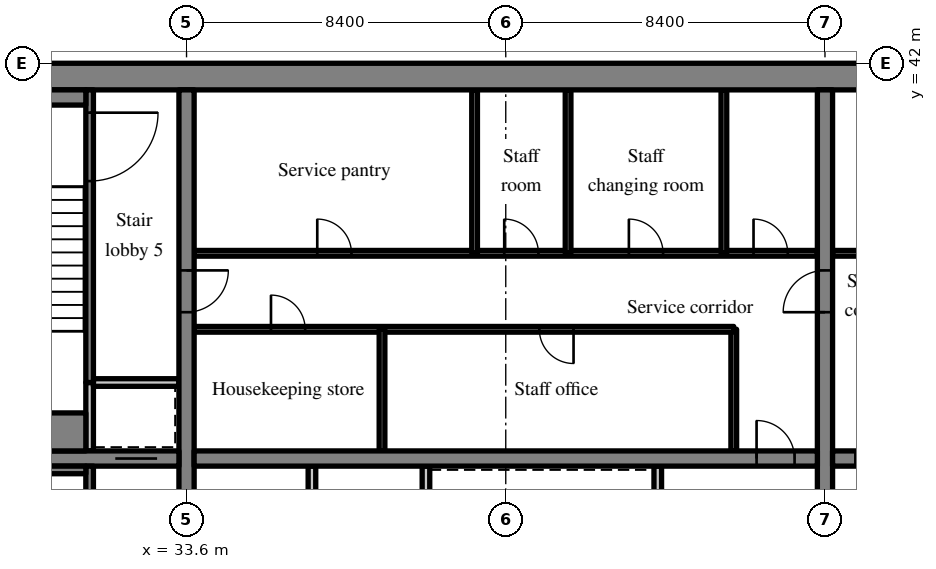
"""IFC4 building model, lengths in metres.
Left out: names, types, materials, properties, quantities, classifications, styles, units other than length and angle.
Written with IfcOpenShell. Run it as: python <this file> out.ifc"""

import sys

from ifc_helpers import new_model, si_unit, direction, frame, frame_2d, origin, place, context, subcontext, project, spatial, rectangle, extrude, source, transform, mapped, element, fill, save


model = new_model("IFC4")
c1 = context("Model", 3, precision=1e-05, world=origin(), true_north=direction((0.0, 1.0)))
c2 = subcontext(c1, "Body", "Model", "MODEL_VIEW")
j1 = project(units=[si_unit("LENGTHUNIT", "METRE"), si_unit("PLANEANGLEUNIT", "RADIAN")], contexts=[c1])
p1 = place(None, origin())
s1 = spatial("IfcSite", under=j1, at=p1, CompositionType="ELEMENT")
p2 = place(p1, origin())
s2 = spatial("IfcBuilding", under=s1, at=p2, CompositionType="ELEMENT")
p3 = place(p2, frame((0.0, 0.0, 166.8)))
s3 = spatial("IfcBuildingStorey", under=s2, at=p3, CompositionType="ELEMENT", Elevation=166.8)
m1 = source(origin(), c2, "Body", "SweptSolid", [
    extrude(rectangle(XDim=50.4, YDim=0.7, at=frame_2d((25.2, 0.0))), origin(), (0.0, 0.0, 1.0), 3.52),
])
p4 = place(p3, frame((25.2, 41.65, 0.0), z_axis=(0.0, 0.0, 1.0), x_axis=(1.0, 0.0, 0.0)))
e1 = element("IfcWall", 1, at=p4, inside=s3, PredefinedType="SHEAR", context=c2, shape_type="MappedRepresentation", body=[
    mapped(m1, transform((0.0, 0.0, 0.0), scale=1.0)),
])
m2 = source(origin(), c2, "Body", "SweptSolid", [
    extrude(rectangle(XDim=18.6, YDim=0.4, at=frame_2d((9.3, 0.0))), origin(), (0.0, 0.0, 1.0), 3.52),
])
p5 = place(p3, frame((33.6, 22.7, 0.0), z_axis=(0.0, 0.0, 1.0), x_axis=(0.0, 1.0, 0.0)))
e2 = element("IfcWall", 2, at=p5, inside=s3, PredefinedType="SHEAR", context=c2, shape_type="MappedRepresentation", body=[
    mapped(m2, transform((0.0, 0.0, 0.0), scale=1.0)),
])
m3 = source(origin(), c2, "Body", "SweptSolid", [
    extrude(rectangle(XDim=1.1, YDim=2.1, at=frame_2d((0.55, 1.05))), frame((0.0, 0.21, 0.0), z_axis=(0.0, -1.0, 0.0), x_axis=(1.0, 0.0, 0.0)), (0.0, 0.0, 1.0), 0.42),
])
p6 = place(p5, frame((12.75, 0.0, 0.0)))
e3 = element("IfcOpeningElement", 3, at=p6, cuts=e2, PredefinedType="OPENING", context=c2, shape_type="MappedRepresentation", body=[
    mapped(m3, transform((0.0, 0.0, 0.0), scale=1.0)),
])
p7 = place(p3, frame((50.4, 22.7, 0.0), z_axis=(0.0, 0.0, 1.0), x_axis=(0.0, 1.0, 0.0)))
e4 = element("IfcWall", 4, at=p7, inside=s3, PredefinedType="SHEAR", context=c2, shape_type="MappedRepresentation", body=[
    mapped(m2, transform((0.0, 0.0, 0.0), scale=1.0)),
])
p8 = place(p7, frame((12.75, 0.0, 0.0)))
e5 = element("IfcOpeningElement", 5, at=p8, cuts=e4, PredefinedType="OPENING", context=c2, shape_type="MappedRepresentation", body=[
    mapped(m3, transform((0.0, 0.0, 0.0), scale=1.0)),
])
m4 = source(origin(), c2, "Body", "SweptSolid", [
    extrude(rectangle(XDim=7.5, YDim=0.4, at=frame_2d((3.75, 0.0))), origin(), (0.0, 0.0, 1.0), 3.52),
])
p9 = place(p3, frame((25.9, 31.6, 0.0), z_axis=(0.0, 0.0, 1.0), x_axis=(1.0, 0.0, 0.0)))
e6 = element("IfcWall", 6, at=p9, inside=s3, PredefinedType="SHEAR", context=c2, shape_type="MappedRepresentation", body=[
    mapped(m4, transform((0.0, 0.0, 0.0), scale=1.0)),
])
p10 = place(p9, frame((5.825, 0.0, 0.0)))
e7 = element("IfcOpeningElement", 7, at=p10, cuts=e6, PredefinedType="OPENING", context=c2, shape_type="MappedRepresentation", body=[
    mapped(m3, transform((0.0, 0.0, 0.0), scale=1.0)),
])
m5 = source(origin(), c2, "Body", "SweptSolid", [
    extrude(rectangle(XDim=16.4, YDim=0.4, at=frame_2d((8.2, 0.0))), origin(), (0.0, 0.0, 1.0), 3.52),
])
p11 = place(p3, frame((33.8, 31.6, 0.0), z_axis=(0.0, 0.0, 1.0), x_axis=(1.0, 0.0, 0.0)))
e8 = element("IfcWall", 8, at=p11, inside=s3, PredefinedType="SHEAR", context=c2, shape_type="MappedRepresentation", body=[
    mapped(m5, transform((0.0, 0.0, 0.0), scale=1.0)),
])
m6 = source(origin(), c2, "Body", "SweptSolid", [
    extrude(rectangle(XDim=1.0, YDim=2.1, at=frame_2d((0.5, 1.05))), frame((0.0, 0.21, 0.0), z_axis=(0.0, -1.0, 0.0), x_axis=(1.0, 0.0, 0.0)), (0.0, 0.0, 1.0), 0.42),
])
p12 = place(p11, frame((14.8, 0.0, 0.0)))
e9 = element("IfcOpeningElement", 9, at=p12, cuts=e8, PredefinedType="OPENING", context=c2, shape_type="MappedRepresentation", body=[
    mapped(m6, transform((0.0, 0.0, 0.0), scale=1.0)),
])
p13 = place(p3, frame((50.6, 31.6, 0.0), z_axis=(0.0, 0.0, 1.0), x_axis=(1.0, 0.0, 0.0)))
e10 = element("IfcWall", 10, at=p13, inside=s3, PredefinedType="SHEAR", context=c2, shape_type="MappedRepresentation", body=[
    mapped(m5, transform((0.0, 0.0, 0.0), scale=1.0)),
])
p14 = place(p13, frame((0.6, 0.0, 0.0)))
e11 = element("IfcOpeningElement", 11, at=p14, cuts=e10, PredefinedType="OPENING", context=c2, shape_type="MappedRepresentation", body=[
    mapped(m6, transform((0.0, 0.0, 0.0), scale=1.0)),
])
m7 = source(origin(), c2, "Body", "SweptSolid", [
    extrude(rectangle(XDim=8.7, YDim=0.2, at=frame_2d((4.35, 0.0))), origin(), (0.0, 0.0, 1.0), 3.52),
])
p15 = place(p3, frame((39.9, 22.7, 0.0), z_axis=(0.0, 0.0, 1.0), x_axis=(0.0, 1.0, 0.0)))
e12 = element("IfcWall", 12, at=p15, inside=s3, PredefinedType="PARTITIONING", context=c2, shape_type="MappedRepresentation", body=[
    mapped(m7, transform((0.0, 0.0, 0.0), scale=1.0)),
])
m8 = source(origin(), c2, "Body", "SweptSolid", [
    extrude(rectangle(XDim=0.9, YDim=2.1, at=frame_2d((0.45, 1.05))), frame((0.0, 0.11, 0.0), z_axis=(0.0, -1.0, 0.0), x_axis=(1.0, 0.0, 0.0)), (0.0, 0.0, 1.0), 0.22),
])
p16 = place(p15, frame((3.85, 0.0, 0.0)))
e13 = element("IfcOpeningElement", 13, at=p16, cuts=e12, PredefinedType="OPENING", context=c2, shape_type="MappedRepresentation", body=[
    mapped(m8, transform((0.0, 0.0, 0.0), scale=1.0)),
])
m9 = source(origin(), c2, "Body", "SweptSolid", [
    extrude(rectangle(XDim=2.6, YDim=0.2, at=frame_2d((1.3, 0.0))), origin(), (0.0, 0.0, 1.0), 3.52),
])
p17 = place(p3, frame((46.0, 28.8, 0.0), z_axis=(0.0, 0.0, 1.0), x_axis=(0.0, 1.0, 0.0)))
e14 = element("IfcWall", 14, at=p17, inside=s3, PredefinedType="SOLIDWALL", context=c2, shape_type="MappedRepresentation", body=[
    mapped(m9, transform((0.0, 0.0, 0.0), scale=1.0)),
])
p18 = place(p3, frame((36.9, 22.7, 0.0), z_axis=(0.0, 0.0, 1.0), x_axis=(0.0, 1.0, 0.0)))
e15 = element("IfcWall", 15, at=p18, inside=s3, PredefinedType="PARTITIONING", context=c2, shape_type="MappedRepresentation", body=[
    mapped(m7, transform((0.0, 0.0, 0.0), scale=1.0)),
])
m10 = source(origin(), c2, "Body", "SweptSolid", [
    extrude(rectangle(XDim=3.2, YDim=0.15, at=frame_2d((1.6, 0.0))), origin(), (0.0, 0.0, 1.0), 3.52),
])
p19 = place(p3, frame((48.0, 31.8, 0.0), z_axis=(0.0, 0.0, 1.0), x_axis=(0.0, 1.0, 0.0)))
e16 = element("IfcWall", 16, at=p19, inside=s3, PredefinedType="PARTITIONING", context=c2, shape_type="MappedRepresentation", body=[
    mapped(m10, transform((0.0, 0.0, 0.0), scale=1.0)),
])
m11 = source(origin(), c2, "Body", "SweptSolid", [
    extrude(rectangle(XDim=14.2, YDim=0.15, at=frame_2d((7.1, 0.0))), origin(), (0.0, 0.0, 1.0), 3.52),
])
p20 = place(p3, frame((33.8, 35.0, 0.0), z_axis=(0.0, 0.0, 1.0), x_axis=(1.0, 0.0, 0.0)))
e17 = element("IfcWall", 17, at=p20, inside=s3, PredefinedType="PARTITIONING", context=c2, shape_type="MappedRepresentation", body=[
    mapped(m11, transform((0.0, 0.0, 0.0), scale=1.0)),
])
m12 = source(origin(), c2, "Body", "SweptSolid", [
    extrude(rectangle(XDim=0.9, YDim=2.1, at=frame_2d((0.45, 1.05))), frame((0.0, 0.085, 0.0), z_axis=(0.0, -1.0, 0.0), x_axis=(1.0, 0.0, 0.0)), (0.0, 0.0, 1.0), 0.17),
])
p21 = place(p20, frame((2.022, 0.0, 0.0)))
e18 = element("IfcOpeningElement", 18, at=p21, cuts=e17, PredefinedType="OPENING", context=c2, shape_type="MappedRepresentation", body=[
    mapped(m12, transform((0.0, 0.0, 0.0), scale=1.0)),
])
p22 = place(p20, frame((9.084, 0.0, 0.0)))
e19 = element("IfcOpeningElement", 19, at=p22, cuts=e17, PredefinedType="OPENING", context=c2, shape_type="MappedRepresentation", body=[
    mapped(m12, transform((0.0, 0.0, 0.0), scale=1.0)),
])
m13 = source(origin(), c2, "Body", "SweptSolid", [
    extrude(rectangle(XDim=16.4, YDim=0.15, at=frame_2d((8.2, 0.0))), origin(), (0.0, 0.0, 1.0), 3.52),
])
p23 = place(p3, frame((33.8, 37.0, 0.0), z_axis=(0.0, 0.0, 1.0), x_axis=(1.0, 0.0, 0.0)))
e20 = element("IfcWall", 20, at=p23, inside=s3, PredefinedType="PARTITIONING", context=c2, shape_type="MappedRepresentation", body=[
    mapped(m13, transform((0.0, 0.0, 0.0), scale=1.0)),
])
p24 = place(p23, frame((3.24, 0.0, 0.0)))
e21 = element("IfcOpeningElement", 21, at=p24, cuts=e20, PredefinedType="OPENING", context=c2, shape_type="MappedRepresentation", body=[
    mapped(m12, transform((0.0, 0.0, 0.0), scale=1.0)),
])
p25 = place(p23, frame((8.16, 0.0, 0.0)))
e22 = element("IfcOpeningElement", 22, at=p25, cuts=e20, PredefinedType="OPENING", context=c2, shape_type="MappedRepresentation", body=[
    mapped(m12, transform((0.0, 0.0, 0.0), scale=1.0)),
])
p26 = place(p23, frame((11.44, 0.0, 0.0)))
e23 = element("IfcOpeningElement", 23, at=p26, cuts=e20, PredefinedType="OPENING", context=c2, shape_type="MappedRepresentation", body=[
    mapped(m12, transform((0.0, 0.0, 0.0), scale=1.0)),
])
p27 = place(p23, frame((14.72, 0.0, 0.0)))
e24 = element("IfcOpeningElement", 24, at=p27, cuts=e20, PredefinedType="OPENING", context=c2, shape_type="MappedRepresentation", body=[
    mapped(m12, transform((0.0, 0.0, 0.0), scale=1.0)),
])
p28 = place(p3, frame((38.744, 31.8, 0.0), z_axis=(0.0, 0.0, 1.0), x_axis=(0.0, 1.0, 0.0)))
e25 = element("IfcWall", 25, at=p28, inside=s3, PredefinedType="PARTITIONING", context=c2, shape_type="MappedRepresentation", body=[
    mapped(m10, transform((0.0, 0.0, 0.0), scale=1.0)),
])
m14 = source(origin(), c2, "Body", "SweptSolid", [
    extrude(rectangle(XDim=4.3, YDim=0.15, at=frame_2d((2.15, 0.0))), origin(), (0.0, 0.0, 1.0), 3.52),
])
for number, where, z_axis, x_axis in (
    (26, (41.18, 37.0, 0.0), (0.0, 0.0, 1.0), (0.0, 1.0, 0.0)),
    (27, (43.64, 37.0, 0.0), (0.0, 0.0, 1.0), (0.0, 1.0, 0.0)),
    (28, (47.74, 37.0, 0.0), (0.0, 0.0, 1.0), (0.0, 1.0, 0.0)),
):
    element("IfcWall", number, at=place(p3, frame(where, z_axis=z_axis, x_axis=x_axis)), inside=s3, PredefinedType="PARTITIONING", context=c2, shape_type="MappedRepresentation", body=[
        mapped(m14, transform((0.0, 0.0, 0.0), scale=1.0)),
    ])
p29 = place(p3, frame((67.0, 37.0, 0.0), z_axis=(0.0, 0.0, 1.0), x_axis=(-1.0, 0.0, 0.0)))
e29 = element("IfcWall", 29, at=p29, inside=s3, PredefinedType="PARTITIONING", context=c2, shape_type="MappedRepresentation", body=[
    mapped(m13, transform((0.0, 0.0, 0.0), scale=1.0)),
])
p30 = place(p29, frame((0.78, 0.0, 0.0)))
e30 = element("IfcOpeningElement", 30, at=p30, cuts=e29, PredefinedType="OPENING", context=c2, shape_type="MappedRepresentation", body=[
    mapped(m12, transform((0.0, 0.0, 0.0), scale=1.0)),
])
p31 = place(p29, frame((3.65, 0.0, 0.0)))
e31 = element("IfcOpeningElement", 31, at=p31, cuts=e29, PredefinedType="OPENING", context=c2, shape_type="MappedRepresentation", body=[
    mapped(m12, transform((0.0, 0.0, 0.0), scale=1.0)),
])
p32 = place(p29, frame((9.39, 0.0, 0.0)))
e32 = element("IfcOpeningElement", 32, at=p32, cuts=e29, PredefinedType="OPENING", context=c2, shape_type="MappedRepresentation", body=[
    mapped(m12, transform((0.0, 0.0, 0.0), scale=1.0)),
])
p33 = place(p29, frame((14.72, 0.0, 0.0)))
e33 = element("IfcOpeningElement", 33, at=p33, cuts=e29, PredefinedType="OPENING", context=c2, shape_type="MappedRepresentation", body=[
    mapped(m12, transform((0.0, 0.0, 0.0), scale=1.0)),
])
m15 = source(origin(), c2, "Body", "SweptSolid", [
    extrude(rectangle(XDim=8.7, YDim=0.2, at=frame_2d((4.35, 0.0))), origin(), (0.0, 0.0, 1.0), 3.52),
])
p34 = place(p3, frame((31.05, 22.7, 0.0), z_axis=(0.0, 0.0, 1.0), x_axis=(0.0, 1.0, 0.0)))
e34 = element("IfcWall", 34, at=p34, inside=s3, PredefinedType="SOLIDWALL", context=c2, shape_type="MappedRepresentation", body=[
    mapped(m15, transform((0.0, 0.0, 0.0), scale=1.0)),
])
m16 = source(origin(), c2, "Body", "SweptSolid", [
    extrude(rectangle(XDim=1.2, YDim=2.1, at=frame_2d((0.6, 1.05))), frame((0.0, 0.11, 0.0), z_axis=(0.0, -1.0, 0.0), x_axis=(1.0, 0.0, 0.0)), (0.0, 0.0, 1.0), 0.22),
])
p35 = place(p34, frame((6.8, 0.0, 0.0)))
e35 = element("IfcOpeningElement", 35, at=p35, cuts=e34, PredefinedType="OPENING", context=c2, shape_type="MappedRepresentation", body=[
    mapped(m16, transform((0.0, 0.0, 0.0), scale=1.0)),
])
m17 = source(origin(), c2, "Body", "SweptSolid", [
    extrude(rectangle(XDim=1.8, YDim=0.2, at=frame_2d((0.9, 0.0))), origin(), (0.0, 0.0, 1.0), 3.52),
])
p36 = place(p3, frame((31.05, 31.8, 0.0), z_axis=(0.0, 0.0, 1.0), x_axis=(0.0, 1.0, 0.0)))
e36 = element("IfcWall", 36, at=p36, inside=s3, PredefinedType="SOLIDWALL", context=c2, shape_type="MappedRepresentation", body=[
    mapped(m17, transform((0.0, 0.0, 0.0), scale=1.0)),
])
m18 = source(origin(), c2, "Body", "SweptSolid", [
    extrude(rectangle(XDim=2.25, YDim=0.2, at=frame_2d((1.125, 0.0))), origin(), (0.0, 0.0, 1.0), 3.52),
])
p37 = place(p3, frame((31.15, 33.6, 0.0), z_axis=(0.0, 0.0, 1.0), x_axis=(1.0, 0.0, 0.0)))
e37 = element("IfcWall", 37, at=p37, inside=s3, PredefinedType="SOLIDWALL", context=c2, shape_type="MappedRepresentation", body=[
    mapped(m18, transform((0.0, 0.0, 0.0), scale=1.0)),
])
m19 = source(origin(), c2, "Body", "SweptSolid", [
    extrude(rectangle(XDim=7.7, YDim=0.2, at=frame_2d((3.85, 0.0))), origin(), (0.0, 0.0, 1.0), 3.52),
])
p38 = place(p3, frame((31.05, 33.6, 0.0), z_axis=(0.0, 0.0, 1.0), x_axis=(0.0, 1.0, 0.0)))
e38 = element("IfcWall", 38, at=p38, inside=s3, PredefinedType="SOLIDWALL", context=c2, shape_type="MappedRepresentation", body=[
    mapped(m19, transform((0.0, 0.0, 0.0), scale=1.0)),
])
m20 = source(origin(), c2, "Body", "SweptSolid", [
    extrude(rectangle(XDim=1.8, YDim=2.1, at=frame_2d((0.9, 1.05))), frame((0.0, 0.11, 0.0), z_axis=(0.0, -1.0, 0.0), x_axis=(1.0, 0.0, 0.0)), (0.0, 0.0, 1.0), 0.22),
])
p39 = place(p38, frame((5.3, 0.0, 0.0)))
e39 = element("IfcOpeningElement", 39, at=p39, cuts=e38, PredefinedType="OPENING", context=c2, shape_type="MappedRepresentation", body=[
    mapped(m20, transform((0.0, 0.0, 0.0), scale=1.0)),
])
m21 = source(origin(), c2, "Body", "SweptSolid", [
    extrude(rectangle(XDim=5.05, YDim=0.2, at=frame_2d((2.525, 0.0))), origin(), (0.0, 0.0, 1.0), 3.52),
])
p40 = place(p3, frame((25.9, 31.3, 0.0), z_axis=(0.0, 0.0, 1.0), x_axis=(1.0, 0.0, 0.0)))
e40 = element("IfcWall", 40, at=p40, inside=s3, PredefinedType="SOLIDWALL", context=c2, shape_type="MappedRepresentation", body=[
    mapped(m21, transform((0.0, 0.0, 0.0), scale=1.0)),
])
m22 = source(origin(), c2, "Body", "SweptSolid", [
    extrude(rectangle(XDim=5.05, YDim=0.4, at=frame_2d((2.525, 0.0))), origin(), (0.0, 0.0, 1.0), 3.52),
])
p41 = place(p3, frame((25.9, 41.1, 0.0), z_axis=(0.0, 0.0, 1.0), x_axis=(1.0, 0.0, 0.0)))
e41 = element("IfcWall", 41, at=p41, inside=s3, PredefinedType="SOLIDWALL", context=c2, shape_type="MappedRepresentation", body=[
    mapped(m22, transform((0.0, 0.0, 0.0), scale=1.0)),
])
m23 = source(origin(), c2, "Body", "SweptSolid", [
    extrude(rectangle(XDim=5.05, YDim=1.0, at=frame_2d((2.525, 0.0))), origin(), (0.0, 0.0, 1.0), 3.52),
])
p42 = place(p3, frame((25.9, 32.3, 0.0), z_axis=(0.0, 0.0, 1.0), x_axis=(1.0, 0.0, 0.0)))
e42 = element("IfcWall", 42, at=p42, inside=s3, PredefinedType="SOLIDWALL", context=c2, shape_type="MappedRepresentation", body=[
    mapped(m23, transform((0.0, 0.0, 0.0), scale=1.0)),
])
m24 = source(origin(), c2, "Body", "SweptSolid", [
    extrude(rectangle(XDim=1.0, YDim=2.1, at=frame_2d((0.5, 1.05))), frame((0.0, 0.025, 0.0), z_axis=(0.0, -1.0, 0.0), x_axis=(1.0, 0.0, 0.0)), (0.0, 0.0, 1.0), 0.05),
])
p43 = place(p12, origin())
e43 = element("IfcDoor", 43, at=p43, inside=s3, OperationType="SINGLE_SWING_LEFT", PredefinedType="DOOR", context=c2, shape_type="MappedRepresentation", body=[
    mapped(m24, transform((0.0, 0.0, 0.0), scale=1.0)),
])
fill(e9, e43)
m25 = source(origin(), c2, "Body", "SweptSolid", [
    extrude(rectangle(XDim=0.9, YDim=2.1, at=frame_2d((0.45, 1.05))), frame((0.0, 0.025, 0.0), z_axis=(0.0, -1.0, 0.0), x_axis=(1.0, 0.0, 0.0)), (0.0, 0.0, 1.0), 0.05),
])
p44 = place(p21, origin())
e44 = element("IfcDoor", 44, at=p44, inside=s3, OperationType="SINGLE_SWING_LEFT", PredefinedType="DOOR", context=c2, shape_type="MappedRepresentation", body=[
    mapped(m25, transform((0.0, 0.0, 0.0), scale=1.0)),
])
fill(e18, e44)
p45 = place(p22, origin())
e45 = element("IfcDoor", 45, at=p45, inside=s3, OperationType="SINGLE_SWING_RIGHT", PredefinedType="DOOR", context=c2, shape_type="MappedRepresentation", body=[
    mapped(m25, transform((0.0, 0.0, 0.0), scale=1.0)),
])
fill(e19, e45)
p46 = place(p24, origin())
e46 = element("IfcDoor", 46, at=p46, inside=s3, OperationType="SINGLE_SWING_LEFT", PredefinedType="DOOR", context=c2, shape_type="MappedRepresentation", body=[
    mapped(m25, transform((0.0, 0.0, 0.0), scale=1.0)),
])
fill(e21, e46)
p47 = place(p25, origin())
e47 = element("IfcDoor", 47, at=p47, inside=s3, OperationType="SINGLE_SWING_LEFT", PredefinedType="DOOR", context=c2, shape_type="MappedRepresentation", body=[
    mapped(m25, transform((0.0, 0.0, 0.0), scale=1.0)),
])
fill(e22, e47)
p48 = place(p26, origin())
e48 = element("IfcDoor", 48, at=p48, inside=s3, OperationType="SINGLE_SWING_LEFT", PredefinedType="DOOR", context=c2, shape_type="MappedRepresentation", body=[
    mapped(m25, transform((0.0, 0.0, 0.0), scale=1.0)),
])
fill(e23, e48)
p49 = place(p27, origin())
e49 = element("IfcDoor", 49, at=p49, inside=s3, OperationType="SINGLE_SWING_LEFT", PredefinedType="DOOR", context=c2, shape_type="MappedRepresentation", body=[
    mapped(m25, transform((0.0, 0.0, 0.0), scale=1.0)),
])
fill(e24, e49)
m26 = source(origin(), c2, "Body", "SweptSolid", [
    extrude(rectangle(XDim=1.1, YDim=2.1, at=frame_2d((0.55, 1.05))), frame((0.0, 0.025, 0.0), z_axis=(0.0, -1.0, 0.0), x_axis=(1.0, 0.0, 0.0)), (0.0, 0.0, 1.0), 0.05),
])
p50 = place(p10, origin())
e50 = element("IfcDoor", 50, at=p50, inside=s3, OperationType="SLIDING_TO_LEFT", PredefinedType="DOOR", context=c2, shape_type="MappedRepresentation", body=[
    mapped(m26, transform((0.0, 0.0, 0.0), scale=1.0)),
])
fill(e7, e50)
m27 = source(origin(), c2, "Body", "SweptSolid", [
    extrude(rectangle(XDim=1.8, YDim=2.1, at=frame_2d((0.9, 1.05))), frame((0.0, 0.025, 0.0), z_axis=(0.0, -1.0, 0.0), x_axis=(1.0, 0.0, 0.0)), (0.0, 0.0, 1.0), 0.05),
])
p51 = place(p39, origin())
e51 = element("IfcDoor", 51, at=p51, inside=s3, OperationType="SINGLE_SWING_RIGHT", PredefinedType="DOOR", context=c2, shape_type="MappedRepresentation", body=[
    mapped(m27, transform((0.0, 0.0, 0.0), scale=1.0)),
])
fill(e39, e51)
p52 = place(p6, origin())
e52 = element("IfcDoor", 52, at=p52, inside=s3, OperationType="SINGLE_SWING_RIGHT", PredefinedType="DOOR", context=c2, shape_type="MappedRepresentation", body=[
    mapped(m26, transform((0.0, 0.0, 0.0), scale=1.0)),
])
fill(e3, e52)
p53 = place(p8, origin())
e53 = element("IfcDoor", 53, at=p53, inside=s3, OperationType="SINGLE_SWING_LEFT", PredefinedType="DOOR", context=c2, shape_type="MappedRepresentation", body=[
    mapped(m26, transform((0.0, 0.0, 0.0), scale=1.0)),
])
fill(e5, e53)
save(model, sys.argv[1])
